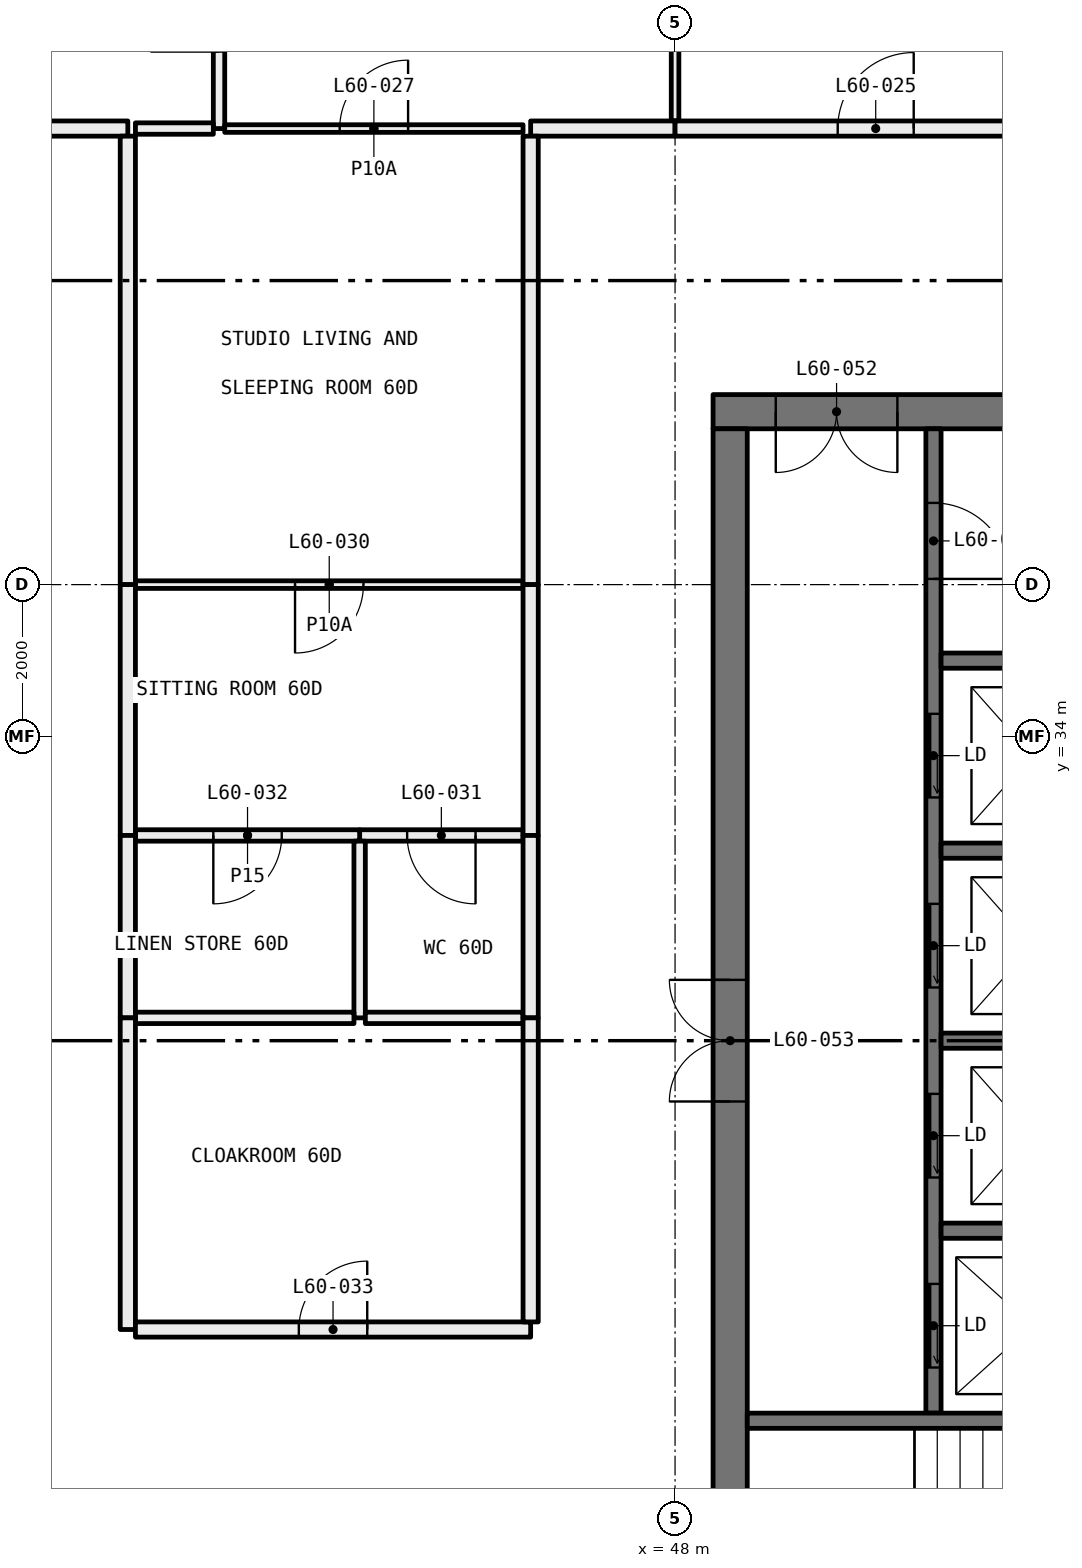
"""IFC4 building model, lengths in metres.
Left out: names, types, materials, properties, quantities, classifications, styles, units other than length and angle.
Written with IfcOpenShell. Run it as: python <this file> out.ifc"""

import sys

from ifc_helpers import new_model, si_unit, direction, frame, frame_2d, origin, place, context, subcontext, project, spatial, rectangle, extrude, element, fill, save


model = new_model("IFC4")
c1 = context("Model", 3, precision=1e-05, world=origin(), true_north=direction((0.0, 1.0)))
c2 = subcontext(c1, "Body", "Model", "MODEL_VIEW")
j1 = project(units=[si_unit("LENGTHUNIT", "METRE"), si_unit("PLANEANGLEUNIT", "RADIAN")], contexts=[c1])
p1 = place(None, origin())
s1 = spatial("IfcSite", under=j1, at=p1, CompositionType="ELEMENT")
p2 = place(p1, origin())
s2 = spatial("IfcBuilding", under=s1, at=p2, CompositionType="ELEMENT")
p3 = place(p2, frame((0.0, 0.0, 224.85)))
s3 = spatial("IfcBuildingStorey", under=s2, at=p3, CompositionType="ELEMENT", Elevation=224.85)
p4 = place(p3, frame((42.0, 42.0, 0.0), z_axis=(0.0, 0.0, 1.0), x_axis=(0.0, 1.0, 0.0)))
e1 = element("IfcWall", 1, at=p4, inside=s3, PredefinedType="PARTITIONING", context=c2, shape_type="SweptSolid", body=[
    extrude(rectangle(XDim=2.925, YDim=0.15, at=frame_2d((1.462, 0.0))), origin(), (0.0, 0.0, 1.0), 3.05),
])
p5 = place(p4, frame((1.012, 0.0, 0.0)))
e2 = element("IfcOpeningElement", 2, at=p5, cuts=e1, PredefinedType="OPENING", context=c2, shape_type="SweptSolid", body=[
    extrude(rectangle(XDim=0.9, YDim=2.1, at=frame_2d((0.45, 1.05))), frame((0.0, 0.085, 0.0), z_axis=(0.0, -1.0, 0.0), x_axis=(1.0, 0.0, 0.0)), (0.0, 0.0, 1.0), 0.17),
])
p6 = place(p3, frame((40.9, 42.0, 0.0), z_axis=(0.0, 0.0, 1.0), x_axis=(1.0, 0.0, 0.0)))
e3 = element("IfcWall", 3, at=p6, inside=s3, PredefinedType="PARTITIONING", context=c2, shape_type="SweptSolid", body=[
    extrude(rectangle(XDim=1.025, YDim=0.15, at=frame_2d((0.513, 0.0))), origin(), (0.0, 0.0, 1.0), 3.05),
])
p7 = place(p3, frame((38.5, 42.0, 0.0), z_axis=(0.0, 0.0, 1.0), x_axis=(1.0, 0.0, 0.0)))
e4 = element("IfcWall", 4, at=p7, inside=s3, PredefinedType="PARTITIONING", context=c2, shape_type="SweptSolid", body=[
    extrude(rectangle(XDim=2.3, YDim=0.2, at=frame_2d((1.15, 0.0))), origin(), (0.0, 0.0, 1.0), 3.05),
])
p8 = place(p3, frame((48.0, 42.1, 0.0), z_axis=(0.0, 0.0, 1.0), x_axis=(0.0, 1.0, 0.0)))
e5 = element("IfcWall", 5, at=p8, inside=s3, PredefinedType="PARTITIONING", context=c2, shape_type="SweptSolid", body=[
    extrude(rectangle(XDim=5.18, YDim=0.1, at=frame_2d((2.59, 0.0))), origin(), (0.0, 0.0, 1.0), 3.05),
])
p9 = place(p8, frame((2.14, 0.0, 0.0)))
e6 = element("IfcOpeningElement", 6, at=p9, cuts=e5, PredefinedType="OPENING", context=c2, shape_type="SweptSolid", body=[
    extrude(rectangle(XDim=0.9, YDim=2.1, at=frame_2d((0.45, 1.05))), frame((0.0, 0.06, 0.0), z_axis=(0.0, -1.0, 0.0), x_axis=(1.0, 0.0, 0.0)), (0.0, 0.0, 1.0), 0.12),
])
p10 = place(p3, frame((42.075, 42.0, 0.0), z_axis=(0.0, 0.0, 1.0), x_axis=(1.0, 0.0, 0.0)))
e7 = element("IfcWall", 7, at=p10, inside=s3, PredefinedType="PARTITIONING", context=c2, shape_type="SweptSolid", body=[
    extrude(rectangle(XDim=3.925, YDim=0.1, at=frame_2d((1.962, 0.0))), origin(), (0.0, 0.0, 1.0), 3.05),
])
p11 = place(p10, frame((1.512, 0.0, 0.0)))
e8 = element("IfcOpeningElement", 8, at=p11, cuts=e7, PredefinedType="OPENING", context=c2, shape_type="SweptSolid", body=[
    extrude(rectangle(XDim=0.9, YDim=2.1, at=frame_2d((0.45, 1.05))), frame((0.0, 0.06, 0.0), z_axis=(0.0, -1.0, 0.0), x_axis=(1.0, 0.0, 0.0)), (0.0, 0.0, 1.0), 0.12),
])
p12 = place(p3, frame((46.1, 42.0, 0.0), z_axis=(0.0, 0.0, 1.0), x_axis=(1.0, 0.0, 0.0)))
e9 = element("IfcWall", 9, at=p12, inside=s3, PredefinedType="PARTITIONING", context=c2, shape_type="SweptSolid", body=[
    extrude(rectangle(XDim=1.9, YDim=0.2, at=frame_2d((0.95, 0.0))), origin(), (0.0, 0.0, 1.0), 3.05),
])
p13 = place(p3, frame((48.0, 42.0, 0.0), z_axis=(0.0, 0.0, 1.0), x_axis=(1.0, 0.0, 0.0)))
e10 = element("IfcWall", 10, at=p13, inside=s3, PredefinedType="PARTITIONING", context=c2, shape_type="SweptSolid", body=[
    extrude(rectangle(XDim=5.28, YDim=0.2, at=frame_2d((2.64, 0.0))), origin(), (0.0, 0.0, 1.0), 3.05),
])
p14 = place(p13, frame((2.14, 0.0, 0.0)))
e11 = element("IfcOpeningElement", 11, at=p14, cuts=e10, PredefinedType="OPENING", context=c2, shape_type="SweptSolid", body=[
    extrude(rectangle(XDim=1.0, YDim=2.1, at=frame_2d((0.5, 1.05))), frame((0.0, 0.11, 0.0), z_axis=(0.0, -1.0, 0.0), x_axis=(1.0, 0.0, 0.0)), (0.0, 0.0, 1.0), 0.22),
])
p15 = place(p3, frame((40.9, 36.0, 0.0), z_axis=(0.0, 0.0, 1.0), x_axis=(1.0, 0.0, 0.0)))
e12 = element("IfcWall", 12, at=p15, inside=s3, PredefinedType="PARTITIONING", context=c2, shape_type="SweptSolid", body=[
    extrude(rectangle(XDim=5.1, YDim=0.1, at=frame_2d((2.55, 0.0))), origin(), (0.0, 0.0, 1.0), 2.45),
])
p16 = place(p15, frame((2.1, 0.0, 0.0)))
e13 = element("IfcOpeningElement", 13, at=p16, cuts=e12, PredefinedType="OPENING", context=c2, shape_type="SweptSolid", body=[
    extrude(rectangle(XDim=0.9, YDim=2.1, at=frame_2d((0.45, 1.05))), frame((0.0, 0.06, 0.0), z_axis=(0.0, -1.0, 0.0), x_axis=(1.0, 0.0, 0.0)), (0.0, 0.0, 1.0), 0.12),
])
for number, where, z_axis, x_axis in (
    (14, (40.8, 41.9, 0.0), (0.0, 0.0, 1.0), (0.0, -1.0, 0.0)),
    (15, (46.1, 36.0, 0.0), (0.0, 0.0, 1.0), (0.0, 1.0, 0.0)),
):
    element("IfcWall", number, at=place(p3, frame(where, z_axis=z_axis, x_axis=x_axis)), inside=s3, PredefinedType="PARTITIONING", context=c2, shape_type="SweptSolid", body=[
        extrude(rectangle(XDim=5.9, YDim=0.2, at=frame_2d((2.95, 0.0))), origin(), (0.0, 0.0, 1.0), 2.45),
    ])
p17 = place(p3, frame((43.85, 32.7, 0.0), z_axis=(0.0, 0.0, 1.0), x_axis=(1.0, 0.0, 0.0)))
e16 = element("IfcWall", 16, at=p17, inside=s3, PredefinedType="PARTITIONING", context=c2, shape_type="SweptSolid", body=[
    extrude(rectangle(XDim=2.15, YDim=0.15, at=frame_2d((1.075, 0.0))), origin(), (0.0, 0.0, 1.0), 3.05),
])
p18 = place(p17, frame((0.625, 0.0, 0.0)))
e17 = element("IfcOpeningElement", 17, at=p18, cuts=e16, PredefinedType="OPENING", context=c2, shape_type="SweptSolid", body=[
    extrude(rectangle(XDim=0.9, YDim=2.1, at=frame_2d((0.45, 1.05))), frame((0.0, 0.085, 0.0), z_axis=(0.0, -1.0, 0.0), x_axis=(1.0, 0.0, 0.0)), (0.0, 0.0, 1.0), 0.17),
])
p19 = place(p3, frame((40.9, 32.7, 0.0), z_axis=(0.0, 0.0, 1.0), x_axis=(1.0, 0.0, 0.0)))
e18 = element("IfcWall", 18, at=p19, inside=s3, PredefinedType="PARTITIONING", context=c2, shape_type="SweptSolid", body=[
    extrude(rectangle(XDim=2.95, YDim=0.15, at=frame_2d((1.475, 0.0))), origin(), (0.0, 0.0, 1.0), 3.05),
])
p20 = place(p19, frame((1.025, 0.0, 0.0)))
e19 = element("IfcOpeningElement", 19, at=p20, cuts=e18, PredefinedType="OPENING", context=c2, shape_type="SweptSolid", body=[
    extrude(rectangle(XDim=0.9, YDim=2.1, at=frame_2d((0.45, 1.05))), frame((0.0, 0.085, 0.0), z_axis=(0.0, -1.0, 0.0), x_axis=(1.0, 0.0, 0.0)), (0.0, 0.0, 1.0), 0.17),
])
for number, where, z_axis, x_axis in (
    (20, (40.8, 36.0, 0.0), (0.0, 0.0, 1.0), (0.0, -1.0, 0.0)),
    (21, (46.1, 32.7, 0.0), (0.0, 0.0, 1.0), (0.0, 1.0, 0.0)),
):
    element("IfcWall", number, at=place(p3, frame(where, z_axis=z_axis, x_axis=x_axis)), inside=s3, PredefinedType="PARTITIONING", context=c2, shape_type="SweptSolid", body=[
        extrude(rectangle(XDim=3.3, YDim=0.2, at=frame_2d((1.65, 0.0))), origin(), (0.0, 0.0, 1.0), 2.45),
    ])
p21 = place(p3, frame((43.85, 32.625, 0.0), z_axis=(0.0, 0.0, 1.0), x_axis=(0.0, -1.0, 0.0)))
e22 = element("IfcWall", 22, at=p21, inside=s3, PredefinedType="PARTITIONING", context=c2, shape_type="SweptSolid", body=[
    extrude(rectangle(XDim=2.325, YDim=0.15, at=frame_2d((1.163, 0.0))), origin(), (0.0, 0.0, 1.0), 3.05),
])
p22 = place(p3, frame((43.925, 30.3, 0.0), z_axis=(0.0, 0.0, 1.0), x_axis=(1.0, 0.0, 0.0)))
e23 = element("IfcWall", 23, at=p22, inside=s3, PredefinedType="PARTITIONING", context=c2, shape_type="SweptSolid", body=[
    extrude(rectangle(XDim=2.075, YDim=0.15, at=frame_2d((1.038, 0.0))), origin(), (0.0, 0.0, 1.0), 3.05),
])
p23 = place(p3, frame((46.1, 30.3, 0.0), z_axis=(0.0, 0.0, 1.0), x_axis=(0.0, 1.0, 0.0)))
e24 = element("IfcWall", 24, at=p23, inside=s3, PredefinedType="PARTITIONING", context=c2, shape_type="SweptSolid", body=[
    extrude(rectangle(XDim=2.4, YDim=0.2, at=frame_2d((1.2, 0.0))), origin(), (0.0, 0.0, 1.0), 3.05),
])
p24 = place(p3, frame((40.9, 30.3, 0.0), z_axis=(0.0, 0.0, 1.0), x_axis=(1.0, 0.0, 0.0)))
e25 = element("IfcWall", 25, at=p24, inside=s3, PredefinedType="PARTITIONING", context=c2, shape_type="SweptSolid", body=[
    extrude(rectangle(XDim=2.875, YDim=0.15, at=frame_2d((1.438, 0.0))), origin(), (0.0, 0.0, 1.0), 3.05),
])
p25 = place(p3, frame((40.8, 32.7, 0.0), z_axis=(0.0, 0.0, 1.0), x_axis=(0.0, -1.0, 0.0)))
e26 = element("IfcWall", 26, at=p25, inside=s3, PredefinedType="PARTITIONING", context=c2, shape_type="SweptSolid", body=[
    extrude(rectangle(XDim=2.4, YDim=0.2, at=frame_2d((1.2, 0.0))), origin(), (0.0, 0.0, 1.0), 3.05),
])
p26 = place(p3, frame((40.8, 30.3, 0.0), z_axis=(0.0, 0.0, 1.0), x_axis=(0.0, -1.0, 0.0)))
e27 = element("IfcWall", 27, at=p26, inside=s3, PredefinedType="PARTITIONING", context=c2, shape_type="SweptSolid", body=[
    extrude(rectangle(XDim=4.1, YDim=0.2, at=frame_2d((2.05, 0.0))), origin(), (0.0, 0.0, 1.0), 3.05),
])
p27 = place(p3, frame((40.9, 26.2, 0.0), z_axis=(0.0, 0.0, 1.0), x_axis=(1.0, 0.0, 0.0)))
e28 = element("IfcWall", 28, at=p27, inside=s3, PredefinedType="PARTITIONING", context=c2, shape_type="SweptSolid", body=[
    extrude(rectangle(XDim=5.2, YDim=0.2, at=frame_2d((2.6, 0.0))), origin(), (0.0, 0.0, 1.0), 3.05),
])
p28 = place(p27, frame((2.15, 0.0, 0.0)))
e29 = element("IfcOpeningElement", 29, at=p28, cuts=e28, PredefinedType="OPENING", context=c2, shape_type="SweptSolid", body=[
    extrude(rectangle(XDim=0.9, YDim=2.1, at=frame_2d((0.45, 1.05))), frame((0.0, 0.11, 0.0), z_axis=(0.0, -1.0, 0.0), x_axis=(1.0, 0.0, 0.0)), (0.0, 0.0, 1.0), 0.22),
])
p29 = place(p3, frame((46.1, 26.3, 0.0), z_axis=(0.0, 0.0, 1.0), x_axis=(0.0, 1.0, 0.0)))
e30 = element("IfcWall", 30, at=p29, inside=s3, PredefinedType="PARTITIONING", context=c2, shape_type="SweptSolid", body=[
    extrude(rectangle(XDim=4.0, YDim=0.2, at=frame_2d((2.0, 0.0))), origin(), (0.0, 0.0, 1.0), 3.05),
])
p30 = place(p3, frame((59.5, 38.275, 0.0), z_axis=(0.0, 0.0, 1.0), x_axis=(-1.0, 0.0, 0.0)))
e31 = element("IfcWall", 31, at=p30, inside=s3, PredefinedType="SHEAR", context=c2, shape_type="SweptSolid", body=[
    extrude(rectangle(XDim=11.0, YDim=0.45, at=frame_2d((5.5, 0.0))), origin(), (0.0, 0.0, 1.0), 3.05),
])
p31 = place(p30, frame((8.575, 0.0, 0.0)))
e32 = element("IfcOpeningElement", 32, at=p31, cuts=e31, PredefinedType="OPENING", context=c2, shape_type="SweptSolid", body=[
    extrude(rectangle(XDim=1.6, YDim=2.1, at=frame_2d((0.8, 1.05))), frame((0.0, 0.235, 0.0), z_axis=(0.0, -1.0, 0.0), x_axis=(1.0, 0.0, 0.0)), (0.0, 0.0, 1.0), 0.47),
])
p32 = place(p3, frame((48.725, 21.95, 0.0), z_axis=(0.0, 0.0, 1.0), x_axis=(0.0, 1.0, 0.0)))
e33 = element("IfcWall", 33, at=p32, inside=s3, PredefinedType="SHEAR", context=c2, shape_type="SweptSolid", body=[
    extrude(rectangle(XDim=16.1, YDim=0.45, at=frame_2d((8.05, 0.0))), origin(), (0.0, 0.0, 1.0), 3.05),
])
p33 = place(p32, frame((7.25, 0.0, 0.0)))
e34 = element("IfcOpeningElement", 34, at=p33, cuts=e33, PredefinedType="OPENING", context=c2, shape_type="SweptSolid", body=[
    extrude(rectangle(XDim=1.6, YDim=2.1, at=frame_2d((0.8, 1.05))), frame((0.0, 0.235, 0.0), z_axis=(0.0, -1.0, 0.0), x_axis=(1.0, 0.0, 0.0)), (0.0, 0.0, 1.0), 0.47),
])
p34 = place(p3, frame((51.4, 25.1, 0.0), z_axis=(0.0, 0.0, 1.0), x_axis=(0.0, 1.0, 0.0)))
e35 = element("IfcWall", 35, at=p34, inside=s3, PredefinedType="SOLIDWALL", context=c2, shape_type="SweptSolid", body=[
    extrude(rectangle(XDim=12.95, YDim=0.2, at=frame_2d((6.475, 0.0))), origin(), (0.0, 0.0, 1.0), 3.05),
])
p35 = place(p34, frame((0.6, 0.0, 0.0)))
e36 = element("IfcOpeningElement", 36, at=p35, cuts=e35, PredefinedType="OPENING", context=c2, shape_type="SweptSolid", body=[
    extrude(rectangle(XDim=1.1, YDim=2.1, at=frame_2d((0.55, 1.05))), frame((0.0, 0.11, 0.0), z_axis=(0.0, -1.0, 0.0), x_axis=(1.0, 0.0, 0.0)), (0.0, 0.0, 1.0), 0.22),
])
p36 = place(p34, frame((3.1, 0.0, 0.0)))
e37 = element("IfcOpeningElement", 37, at=p36, cuts=e35, PredefinedType="OPENING", context=c2, shape_type="SweptSolid", body=[
    extrude(rectangle(XDim=1.1, YDim=2.1, at=frame_2d((0.55, 1.05))), frame((0.0, 0.11, 0.0), z_axis=(0.0, -1.0, 0.0), x_axis=(1.0, 0.0, 0.0)), (0.0, 0.0, 1.0), 0.22),
])
p37 = place(p34, frame((5.6, 0.0, 0.0)))
e38 = element("IfcOpeningElement", 38, at=p37, cuts=e35, PredefinedType="OPENING", context=c2, shape_type="SweptSolid", body=[
    extrude(rectangle(XDim=1.1, YDim=2.1, at=frame_2d((0.55, 1.05))), frame((0.0, 0.11, 0.0), z_axis=(0.0, -1.0, 0.0), x_axis=(1.0, 0.0, 0.0)), (0.0, 0.0, 1.0), 0.22),
])
p38 = place(p34, frame((8.1, 0.0, 0.0)))
e39 = element("IfcOpeningElement", 39, at=p38, cuts=e35, PredefinedType="OPENING", context=c2, shape_type="SweptSolid", body=[
    extrude(rectangle(XDim=1.1, YDim=2.1, at=frame_2d((0.55, 1.05))), frame((0.0, 0.11, 0.0), z_axis=(0.0, -1.0, 0.0), x_axis=(1.0, 0.0, 0.0)), (0.0, 0.0, 1.0), 0.22),
])
p39 = place(p34, frame((10.975, 0.0, 0.0)))
e40 = element("IfcOpeningElement", 40, at=p39, cuts=e35, PredefinedType="OPENING", context=c2, shape_type="SweptSolid", body=[
    extrude(rectangle(XDim=1.0, YDim=2.1, at=frame_2d((0.5, 1.05))), frame((0.0, 0.11, 0.0), z_axis=(0.0, -1.0, 0.0), x_axis=(1.0, 0.0, 0.0)), (0.0, 0.0, 1.0), 0.22),
])
for number, where, z_axis, x_axis in (
    (41, (56.5, 25.0, 0.0), (0.0, 0.0, 1.0), (-1.0, 0.0, 0.0)),
    (42, (59.05, 35.0, 0.0), (0.0, 0.0, 1.0), (-1.0, 0.0, 0.0)),
):
    element("IfcWall", number, at=place(p3, frame(where, z_axis=z_axis, x_axis=x_axis)), inside=s3, PredefinedType="SOLIDWALL", context=c2, shape_type="SweptSolid", body=[
        extrude(rectangle(XDim=7.55, YDim=0.2, at=frame_2d((3.775, 0.0))), origin(), (0.0, 0.0, 1.0), 3.05),
    ])
for number, where, z_axis, x_axis in (
    (43, (53.9, 27.5, 0.0), (0.0, 0.0, 1.0), (-1.0, 0.0, 0.0)),
    (44, (53.9, 30.0, 0.0), (0.0, 0.0, 1.0), (-1.0, 0.0, 0.0)),
    (45, (53.9, 32.5, 0.0), (0.0, 0.0, 1.0), (-1.0, 0.0, 0.0)),
):
    element("IfcWall", number, at=place(p3, frame(where, z_axis=z_axis, x_axis=x_axis)), inside=s3, PredefinedType="SOLIDWALL", context=c2, shape_type="SweptSolid", body=[
        extrude(rectangle(XDim=2.4, YDim=0.2, at=frame_2d((1.2, 0.0))), origin(), (0.0, 0.0, 1.0), 3.05),
    ])
p40 = place(p14, origin())
e46 = element("IfcDoor", 46, at=p40, inside=s3, OperationType="SINGLE_SWING_LEFT", PredefinedType="DOOR", context=c2, shape_type="SweptSolid", body=[
    extrude(rectangle(XDim=1.0, YDim=2.1, at=frame_2d((0.5, 1.05))), frame((0.0, 0.025, 0.0), z_axis=(0.0, -1.0, 0.0), x_axis=(1.0, 0.0, 0.0)), (0.0, 0.0, 1.0), 0.05),
])
fill(e11, e46)
p41 = place(p11, origin())
e47 = element("IfcDoor", 47, at=p41, inside=s3, OperationType="SINGLE_SWING_LEFT", PredefinedType="DOOR", context=c2, shape_type="SweptSolid", body=[
    extrude(rectangle(XDim=0.9, YDim=2.1, at=frame_2d((0.45, 1.05))), frame((0.0, 0.025, 0.0), z_axis=(0.0, -1.0, 0.0), x_axis=(1.0, 0.0, 0.0)), (0.0, 0.0, 1.0), 0.05),
])
fill(e8, e47)
p42 = place(p16, frame((0.9, 0.0, 0.0), x_axis=(-1.0, 0.0, 0.0)))
e48 = element("IfcDoor", 48, at=p42, inside=s3, OperationType="SINGLE_SWING_LEFT", PredefinedType="DOOR", context=c2, shape_type="SweptSolid", body=[
    extrude(rectangle(XDim=0.9, YDim=2.1, at=frame_2d((0.45, 1.05))), frame((0.0, 0.025, 0.0), z_axis=(0.0, -1.0, 0.0), x_axis=(1.0, 0.0, 0.0)), (0.0, 0.0, 1.0), 0.05),
])
fill(e13, e48)
p43 = place(p18, frame((0.9, 0.0, 0.0), x_axis=(-1.0, 0.0, 0.0)))
e49 = element("IfcDoor", 49, at=p43, inside=s3, OperationType="SINGLE_SWING_RIGHT", PredefinedType="DOOR", context=c2, shape_type="SweptSolid", body=[
    extrude(rectangle(XDim=0.9, YDim=2.1, at=frame_2d((0.45, 1.05))), frame((0.0, 0.025, 0.0), z_axis=(0.0, -1.0, 0.0), x_axis=(1.0, 0.0, 0.0)), (0.0, 0.0, 1.0), 0.05),
])
fill(e17, e49)
p44 = place(p20, frame((0.9, 0.0, 0.0), x_axis=(-1.0, 0.0, 0.0)))
e50 = element("IfcDoor", 50, at=p44, inside=s3, OperationType="SINGLE_SWING_LEFT", PredefinedType="DOOR", context=c2, shape_type="SweptSolid", body=[
    extrude(rectangle(XDim=0.9, YDim=2.1, at=frame_2d((0.45, 1.05))), frame((0.0, 0.025, 0.0), z_axis=(0.0, -1.0, 0.0), x_axis=(1.0, 0.0, 0.0)), (0.0, 0.0, 1.0), 0.05),
])
fill(e19, e50)
p45 = place(p28, origin())
e51 = element("IfcDoor", 51, at=p45, inside=s3, OperationType="SINGLE_SWING_LEFT", PredefinedType="DOOR", context=c2, shape_type="SweptSolid", body=[
    extrude(rectangle(XDim=0.9, YDim=2.1, at=frame_2d((0.45, 1.05))), frame((0.0, 0.025, 0.0), z_axis=(0.0, -1.0, 0.0), x_axis=(1.0, 0.0, 0.0)), (0.0, 0.0, 1.0), 0.05),
])
fill(e29, e51)
p46 = place(p35, origin())
e52 = element("IfcDoor", 52, at=p46, inside=s3, OperationType="SLIDING_TO_LEFT", PredefinedType="DOOR", context=c2, shape_type="SweptSolid", body=[
    extrude(rectangle(XDim=1.1, YDim=2.1, at=frame_2d((0.55, 1.05))), frame((0.0, 0.025, 0.0), z_axis=(0.0, -1.0, 0.0), x_axis=(1.0, 0.0, 0.0)), (0.0, 0.0, 1.0), 0.05),
])
fill(e36, e52)
p47 = place(p36, origin())
e53 = element("IfcDoor", 53, at=p47, inside=s3, OperationType="SLIDING_TO_LEFT", PredefinedType="DOOR", context=c2, shape_type="SweptSolid", body=[
    extrude(rectangle(XDim=1.1, YDim=2.1, at=frame_2d((0.55, 1.05))), frame((0.0, 0.025, 0.0), z_axis=(0.0, -1.0, 0.0), x_axis=(1.0, 0.0, 0.0)), (0.0, 0.0, 1.0), 0.05),
])
fill(e37, e53)
p48 = place(p37, origin())
e54 = element("IfcDoor", 54, at=p48, inside=s3, OperationType="SLIDING_TO_LEFT", PredefinedType="DOOR", context=c2, shape_type="SweptSolid", body=[
    extrude(rectangle(XDim=1.1, YDim=2.1, at=frame_2d((0.55, 1.05))), frame((0.0, 0.025, 0.0), z_axis=(0.0, -1.0, 0.0), x_axis=(1.0, 0.0, 0.0)), (0.0, 0.0, 1.0), 0.05),
])
fill(e38, e54)
p49 = place(p38, origin())
e55 = element("IfcDoor", 55, at=p49, inside=s3, OperationType="SLIDING_TO_LEFT", PredefinedType="DOOR", context=c2, shape_type="SweptSolid", body=[
    extrude(rectangle(XDim=1.1, YDim=2.1, at=frame_2d((0.55, 1.05))), frame((0.0, 0.025, 0.0), z_axis=(0.0, -1.0, 0.0), x_axis=(1.0, 0.0, 0.0)), (0.0, 0.0, 1.0), 0.05),
])
fill(e39, e55)
p50 = place(p39, frame((1.0, 0.0, 0.0), x_axis=(-1.0, 0.0, 0.0)))
e56 = element("IfcDoor", 56, at=p50, inside=s3, OperationType="SINGLE_SWING_LEFT", PredefinedType="DOOR", context=c2, shape_type="SweptSolid", body=[
    extrude(rectangle(XDim=1.0, YDim=2.1, at=frame_2d((0.5, 1.05))), frame((0.0, 0.025, 0.0), z_axis=(0.0, -1.0, 0.0), x_axis=(1.0, 0.0, 0.0)), (0.0, 0.0, 1.0), 0.05),
])
fill(e40, e56)
p51 = place(p31, origin())
e57 = element("IfcDoor", 57, at=p51, inside=s3, OperationType="DOUBLE_DOOR_SINGLE_SWING", PredefinedType="DOOR", context=c2, shape_type="SweptSolid", body=[
    extrude(rectangle(XDim=1.6, YDim=2.1, at=frame_2d((0.8, 1.05))), frame((0.0, 0.025, 0.0), z_axis=(0.0, -1.0, 0.0), x_axis=(1.0, 0.0, 0.0)), (0.0, 0.0, 1.0), 0.05),
])
fill(e32, e57)
p52 = place(p33, origin())
e58 = element("IfcDoor", 58, at=p52, inside=s3, OperationType="DOUBLE_DOOR_SINGLE_SWING", PredefinedType="DOOR", context=c2, shape_type="SweptSolid", body=[
    extrude(rectangle(XDim=1.6, YDim=2.1, at=frame_2d((0.8, 1.05))), frame((0.0, 0.025, 0.0), z_axis=(0.0, -1.0, 0.0), x_axis=(1.0, 0.0, 0.0)), (0.0, 0.0, 1.0), 0.05),
])
fill(e34, e58)
save(model, sys.argv[1])
